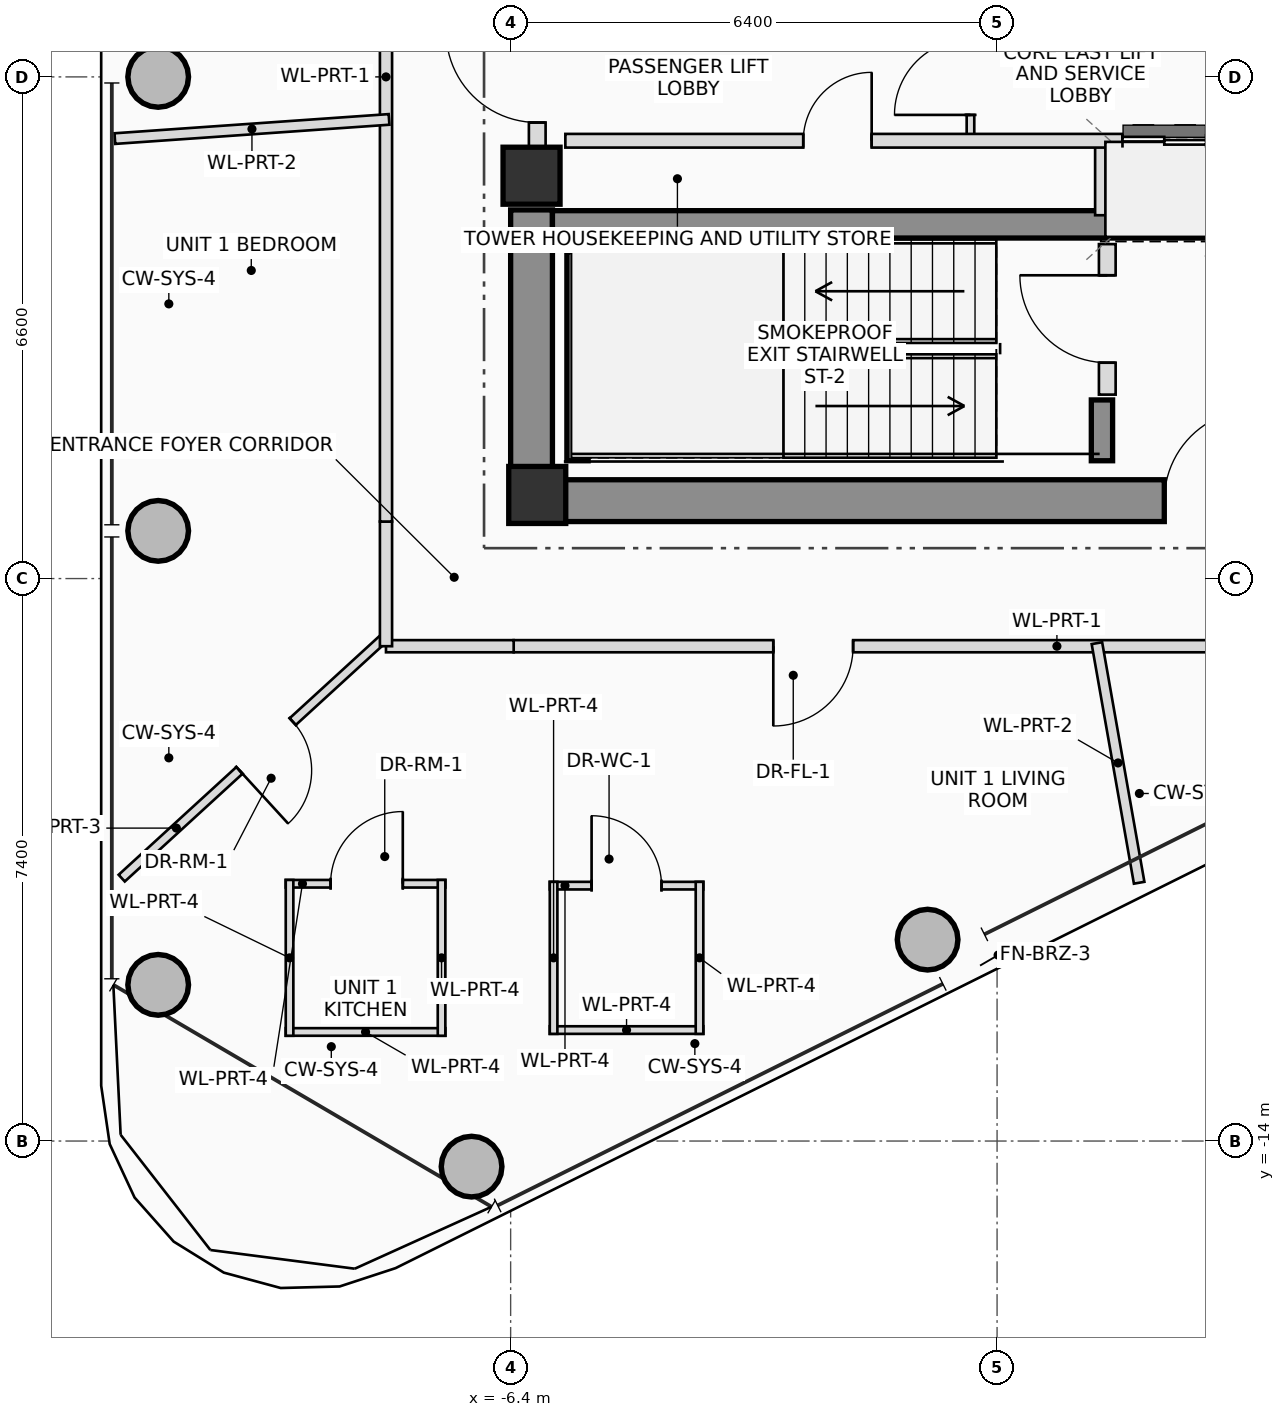
"""IFC4 building model, lengths in metres.
Left out: names, types, materials, properties, quantities, classifications, styles, units other than length and angle.
Written with IfcOpenShell. Run it as: python <this file> out.ifc"""

import sys

from ifc_helpers import new_model, si_unit, direction, frame, frame_2d, origin, origin_2d, place, context, subcontext, project, spatial, rectangle, hollow_circle, extrude, source, transform, mapped, element, fill, save


model = new_model("IFC4")
c1 = context("Model", 3, precision=1e-05, world=origin(), true_north=direction((0.0, 1.0)))
c2 = subcontext(c1, "Body", "Model", "MODEL_VIEW")
j1 = project(units=[si_unit("LENGTHUNIT", "METRE"), si_unit("PLANEANGLEUNIT", "RADIAN")], contexts=[c1])
p1 = place(None, origin())
s1 = spatial("IfcSite", under=j1, at=p1, CompositionType="ELEMENT")
p2 = place(p1, origin())
s2 = spatial("IfcBuilding", under=s1, at=p2, CompositionType="ELEMENT")
p3 = place(p2, frame((0.0, 0.0, 303.65)))
s3 = spatial("IfcBuildingStorey", under=s2, at=p3, CompositionType="ELEMENT", Elevation=303.65)
m1 = source(origin(), c2, "Body", "SweptSolid", [
    extrude(rectangle(XDim=0.75, YDim=0.75, at=origin_2d()), origin(), (0.0, 0.0, 1.0), 3.45),
])
p4 = place(p3, frame((-6.05, -5.5, 0.0), z_axis=(0.0, 0.0, 1.0), x_axis=(1.0, 0.0, 0.0)))
e1 = element("IfcColumn", 1, at=p4, inside=s3, PredefinedType="COLUMN", context=c2, shape_type="MappedRepresentation", body=[
    mapped(m1, transform((0.0, 0.0, 0.0), scale=1.0)),
])
p5 = place(p3, frame((-6.4, -5.575, 0.0), z_axis=(0.0, 0.0, 1.0), x_axis=(1.0, 0.0, 0.0)))
e2 = element("IfcWall", 2, at=p5, inside=s3, PredefinedType="SHEAR", context=c2, shape_type="SweptSolid", body=[
    extrude(rectangle(XDim=12.8, YDim=0.55, at=frame_2d((6.4, 0.0))), origin(), (0.0, 0.0, 1.0), 3.45),
])
p6 = place(p5, frame((8.6, 0.0, 0.0)))
e3 = element("IfcOpeningElement", 3, at=p6, cuts=e2, PredefinedType="OPENING", context=c2, shape_type="SweptSolid", body=[
    extrude(rectangle(XDim=1.2, YDim=2.2, at=frame_2d((0.6, 1.1))), frame((0.0, 0.285, 0.0), z_axis=(0.0, -1.0, 0.0), x_axis=(1.0, 0.0, 0.0)), (0.0, 0.0, 1.0), 0.57),
])
p7 = place(p3, frame((-6.125, -5.3, 0.0), z_axis=(0.0, 0.0, 1.0), x_axis=(0.0, 1.0, 0.0)))
e4 = element("IfcWall", 4, at=p7, inside=s3, PredefinedType="SHEAR", context=c2, shape_type="SweptSolid", body=[
    extrude(rectangle(XDim=3.55, YDim=0.55, at=frame_2d((1.775, 0.0))), origin(), (0.0, 0.0, 1.0), 3.45),
])
p8 = place(p3, frame((-5.85, -1.94, 0.0), z_axis=(0.0, 0.0, 1.0), x_axis=(1.0, 0.0, 0.0)))
e5 = element("IfcWall", 5, at=p8, inside=s3, PredefinedType="SHEAR", context=c2, shape_type="SweptSolid", body=[
    extrude(rectangle(XDim=11.7, YDim=0.36, at=frame_2d((5.85, 0.0))), origin(), (0.0, 0.0, 1.0), 3.45),
])
p9 = place(p3, frame((-5.52, -5.05, 0.0), z_axis=(0.0, 0.0, 1.0), x_axis=(0.0, 1.0, 0.0)))
e6 = element("IfcWall", 6, at=p9, inside=s3, PredefinedType="SHEAR", context=c2, shape_type="SweptSolid", body=[
    extrude(rectangle(XDim=2.75, YDim=0.28, at=frame_2d((1.375, 0.0))), origin(), (0.0, 0.0, 1.0), 3.45),
])
p10 = place(p3, frame((1.38, -5.05, 0.0), z_axis=(0.0, 0.0, 1.0), x_axis=(0.0, 1.0, 0.0)))
e7 = element("IfcWall", 7, at=p10, inside=s3, PredefinedType="SHEAR", context=c2, shape_type="SweptSolid", body=[
    extrude(rectangle(XDim=0.8, YDim=0.28, at=frame_2d((0.4, 0.0))), origin(), (0.0, 0.0, 1.0), 3.45),
])
p11 = place(p3, frame((-6.125, -1.3, 0.0), z_axis=(0.0, 0.0, 1.0), x_axis=(1.0, 0.0, 0.0)))
e8 = element("IfcColumn", 8, at=p11, inside=s3, PredefinedType="COLUMN", context=c2, shape_type="MappedRepresentation", body=[
    mapped(m1, transform((0.0, 0.0, 0.0), scale=1.0)),
])
m2 = source(origin(), c2, "Body", "SweptSolid", [
    extrude(hollow_circle(Radius=0.4, WallThickness=0.028, at=origin_2d()), origin(), (0.0, 0.0, 1.0), 3.45),
])
for number, where, z_axis, x_axis in (
    (9, (-6.914, -14.337, 0.0), (0.0, 0.0, 1.0), (1.0, 0.0, 0.0)),
    (10, (-0.914, -11.35, 0.0), (0.0, 0.0, 1.0), (1.0, 0.0, 0.0)),
    (11, (-11.037, 0.0, 0.0), (0.0, 0.0, 1.0), (1.0, 0.0, 0.0)),
    (12, (-11.037, -5.973, 0.0), (0.0, 0.0, 1.0), (1.0, 0.0, 0.0)),
    (13, (-11.037, -11.945, 0.0), (0.0, 0.0, 1.0), (1.0, 0.0, 0.0)),
):
    element("IfcColumn", number, at=place(p3, frame(where, z_axis=z_axis, x_axis=x_axis)), inside=s3, PredefinedType="COLUMN", context=c2, shape_type="MappedRepresentation", body=[
        mapped(m2, transform((0.0, 0.0, 0.0), scale=1.0)),
    ])
p12 = place(p3, frame((-6.05, -0.95, 0.0), z_axis=(0.0, 0.0, 1.0), x_axis=(0.0, 1.0, 0.0)))
e14 = element("IfcWall", 14, at=p12, inside=s3, PredefinedType="PLUMBINGWALL", context=c2, shape_type="SweptSolid", body=[
    extrude(rectangle(XDim=1.9, YDim=0.22, at=frame_2d((0.95, 0.0))), origin(), (0.0, 0.0, 1.0), 2.23),
])
p13 = place(p12, frame((0.35, 0.0, 0.0)))
e15 = element("IfcOpeningElement", 15, at=p13, cuts=e14, PredefinedType="OPENING", context=c2, shape_type="SweptSolid", body=[
    extrude(rectangle(XDim=1.2, YDim=2.2, at=frame_2d((0.6, 1.1))), frame((0.0, 0.12, 0.0), z_axis=(0.0, -1.0, 0.0), x_axis=(1.0, 0.0, 0.0)), (0.0, 0.0, 1.0), 0.24),
])
p14 = place(p3, frame((1.45, -4.18, 0.0), z_axis=(0.0, 0.0, 1.0), x_axis=(0.0, 1.0, 0.0)))
e16 = element("IfcWall", 16, at=p14, inside=s3, PredefinedType="PLUMBINGWALL", context=c2, shape_type="SweptSolid", body=[
    extrude(rectangle(XDim=1.98, YDim=0.22, at=frame_2d((0.99, 0.0))), origin(), (0.0, 0.0, 1.0), 3.25),
])
p15 = place(p14, frame((0.42, 0.0, 0.0)))
e17 = element("IfcOpeningElement", 17, at=p15, cuts=e16, PredefinedType="OPENING", context=c2, shape_type="SweptSolid", body=[
    extrude(rectangle(XDim=1.15, YDim=2.15, at=frame_2d((0.575, 1.075))), frame((0.0, 0.12, 0.0), z_axis=(0.0, -1.0, 0.0), x_axis=(1.0, 0.0, 0.0)), (0.0, 0.0, 1.0), 0.24),
])
p16 = place(p3, frame((-0.35, -0.84, 0.0), z_axis=(0.0, 0.0, 1.0), x_axis=(0.0, 1.0, 0.0)))
e18 = element("IfcWall", 18, at=p16, inside=s3, PredefinedType="PARTITIONING", context=c2, shape_type="SweptSolid", body=[
    extrude(rectangle(XDim=1.68, YDim=0.1, at=frame_2d((0.84, 0.0))), origin(), (0.0, 0.0, 1.0), 3.25),
])
p17 = place(p16, frame((0.34, 0.0, 0.0)))
e19 = element("IfcOpeningElement", 19, at=p17, cuts=e18, PredefinedType="OPENING", context=c2, shape_type="SweptSolid", body=[
    extrude(rectangle(XDim=1.0, YDim=2.25, at=frame_2d((0.5, 1.125))), frame((0.0, 0.06, 0.0), z_axis=(0.0, -1.0, 0.0), x_axis=(1.0, 0.0, 0.0)), (0.0, 0.0, 1.0), 0.12),
])
p18 = place(p3, frame((1.38, -1.82, 0.0), z_axis=(0.0, 0.0, 1.0), x_axis=(0.0, 1.0, 0.0)))
e20 = element("IfcWall", 20, at=p18, inside=s3, PredefinedType="PLUMBINGWALL", context=c2, shape_type="SweptSolid", body=[
    extrude(rectangle(XDim=0.98, YDim=0.18, at=frame_2d((0.49, 0.0))), origin(), (0.0, 0.0, 1.0), 3.25),
])
p19 = place(p3, frame((-5.68, -0.84, 0.0), z_axis=(0.0, 0.0, 1.0), x_axis=(1.0, 0.0, 0.0)))
e21 = element("IfcWall", 21, at=p19, inside=s3, PredefinedType="PLUMBINGWALL", context=c2, shape_type="SweptSolid", body=[
    extrude(rectangle(XDim=11.33, YDim=0.18, at=frame_2d((5.665, 0.0))), origin(), (0.0, 0.0, 1.0), 3.25),
])
p20 = place(p19, frame((3.13, 0.0, 0.0)))
e22 = element("IfcOpeningElement", 22, at=p20, cuts=e21, PredefinedType="OPENING", context=c2, shape_type="SweptSolid", body=[
    extrude(rectangle(XDim=0.9, YDim=2.05, at=frame_2d((0.45, 1.025))), frame((0.0, 0.1, 0.0), z_axis=(0.0, -1.0, 0.0), x_axis=(1.0, 0.0, 0.0)), (0.0, 0.0, 1.0), 0.2),
])
p21 = place(p19, frame((7.33, 0.0, 0.0)))
e23 = element("IfcOpeningElement", 23, at=p21, cuts=e21, PredefinedType="OPENING", context=c2, shape_type="SweptSolid", body=[
    extrude(rectangle(XDim=1.1, YDim=2.2, at=frame_2d((0.55, 1.1))), frame((0.0, 0.1, 0.0), z_axis=(0.0, -1.0, 0.0), x_axis=(1.0, 0.0, 0.0)), (0.0, 0.0, 1.0), 0.2),
])
p22 = place(p19, frame((9.58, 0.0, 0.0)))
e24 = element("IfcOpeningElement", 24, at=p22, cuts=e21, PredefinedType="OPENING", context=c2, shape_type="SweptSolid", body=[
    extrude(rectangle(XDim=0.9, YDim=2.05, at=frame_2d((0.45, 1.025))), frame((0.0, 0.1, 0.0), z_axis=(0.0, -1.0, 0.0), x_axis=(1.0, 0.0, 0.0)), (0.0, 0.0, 1.0), 0.2),
])
p23 = place(p3, frame((-8.07, -7.386, 0.0), z_axis=(0.0, 0.0, 1.0), x_axis=(-0.737657036201, -0.675175604523, 0.0)))
e25 = element("IfcWall", 25, at=p23, inside=s3, PredefinedType="PARTITIONING", context=c2, shape_type="SweptSolid", body=[
    extrude(rectangle(XDim=4.673, YDim=0.12, at=frame_2d((2.337, 0.0))), origin(), (0.0, 0.0, 1.0), 2.815),
])
p24 = place(p23, frame((1.623, 0.0, 0.0)))
e26 = element("IfcOpeningElement", 26, at=p24, cuts=e25, PredefinedType="OPENING", context=c2, shape_type="SweptSolid", body=[
    extrude(rectangle(XDim=0.95, YDim=2.1, at=frame_2d((0.475, 1.05))), frame((0.0, 0.07, 0.0), z_axis=(0.0, -1.0, 0.0), x_axis=(1.0, 0.0, 0.0)), (0.0, 0.0, 1.0), 0.14),
])
p25 = place(p3, frame((-5.885, -10.64, 0.0), z_axis=(0.0, 0.0, 1.0), x_axis=(1.0, 0.0, 0.0)))
e27 = element("IfcWall", 27, at=p25, inside=s3, PredefinedType="PARTITIONING", context=c2, shape_type="SweptSolid", body=[
    extrude(rectangle(XDim=2.02, YDim=0.1, at=frame_2d((1.01, 0.0))), origin(), (0.0, 0.0, 1.0), 2.905),
])
p26 = place(p25, frame((0.55, 0.0, 0.0)))
e28 = element("IfcOpeningElement", 28, at=p26, cuts=e27, PredefinedType="OPENING", context=c2, shape_type="SweptSolid", body=[
    extrude(rectangle(XDim=0.92, YDim=2.1, at=frame_2d((0.46, 1.05))), frame((0.0, 0.06, 0.0), z_axis=(0.0, -1.0, 0.0), x_axis=(1.0, 0.0, 0.0)), (0.0, 0.0, 1.0), 0.12),
])
p27 = place(p3, frame((-3.865, -12.54, 0.0), z_axis=(0.0, 0.0, 1.0), x_axis=(-1.0, 0.0, 0.0)))
e29 = element("IfcWall", 29, at=p27, inside=s3, PredefinedType="PARTITIONING", context=c2, shape_type="SweptSolid", body=[
    extrude(rectangle(XDim=2.02, YDim=0.1, at=frame_2d((1.01, 0.0))), origin(), (0.0, 0.0, 1.0), 3.25),
])
for number, where, z_axis, x_axis in (
    (30, (-3.915, -10.59, 0.0), (0.0, 0.0, 1.0), (0.0, -1.0, 0.0)),
    (31, (-5.835, -12.59, 0.0), (0.0, 0.0, 1.0), (0.0, 1.0, 0.0)),
):
    element("IfcWall", number, at=place(p3, frame(where, z_axis=z_axis, x_axis=x_axis)), inside=s3, PredefinedType="PARTITIONING", context=c2, shape_type="SweptSolid", body=[
        extrude(rectangle(XDim=2.0, YDim=0.1, at=frame_2d((1.0, 0.0))), origin(), (0.0, 0.0, 1.0), 2.905),
    ])
p28 = place(p3, frame((-9.359, -10.615, 0.0), z_axis=(0.0, 0.0, 1.0), x_axis=(1.0, 0.0, 0.0)))
e32 = element("IfcWall", 32, at=p28, inside=s3, PredefinedType="PARTITIONING", context=c2, shape_type="SweptSolid", body=[
    extrude(rectangle(XDim=2.1, YDim=0.1, at=frame_2d((1.05, 0.0))), origin(), (0.0, 0.0, 1.0), 2.905),
])
p29 = place(p28, frame((0.59, 0.0, 0.0)))
e33 = element("IfcOpeningElement", 33, at=p29, cuts=e32, PredefinedType="OPENING", context=c2, shape_type="SweptSolid", body=[
    extrude(rectangle(XDim=0.95, YDim=2.1, at=frame_2d((0.475, 1.05))), frame((0.0, 0.06, 0.0), z_axis=(0.0, -1.0, 0.0), x_axis=(1.0, 0.0, 0.0)), (0.0, 0.0, 1.0), 0.12),
])
p30 = place(p3, frame((-7.259, -12.565, 0.0), z_axis=(0.0, 0.0, 1.0), x_axis=(-1.0, 0.0, 0.0)))
e34 = element("IfcWall", 34, at=p30, inside=s3, PredefinedType="PARTITIONING", context=c2, shape_type="SweptSolid", body=[
    extrude(rectangle(XDim=2.1, YDim=0.1, at=frame_2d((1.05, 0.0))), origin(), (0.0, 0.0, 1.0), 3.25),
])
for number, where, z_axis, x_axis in (
    (35, (-7.309, -10.565, 0.0), (0.0, 0.0, 1.0), (0.0, -1.0, 0.0)),
    (36, (-9.309, -12.615, 0.0), (0.0, 0.0, 1.0), (0.0, 1.0, 0.0)),
):
    element("IfcWall", number, at=place(p3, frame(where, z_axis=z_axis, x_axis=x_axis)), inside=s3, PredefinedType="PARTITIONING", context=c2, shape_type="SweptSolid", body=[
        extrude(rectangle(XDim=2.05, YDim=0.1, at=frame_2d((1.025, 0.0))), origin(), (0.0, 0.0, 1.0), 2.905),
    ])
p31 = place(p3, frame((3.319, -7.49, 0.0), z_axis=(0.0, 0.0, 1.0), x_axis=(-1.0, 0.0, 0.0)))
e37 = element("IfcWall", 37, at=p31, inside=s3, PredefinedType="PARTITIONING", context=c2, shape_type="SweptSolid", body=[
    extrude(rectangle(XDim=9.679, YDim=0.16, at=frame_2d((4.84, 0.0))), origin(), (0.0, 0.0, 1.0), 2.655),
])
p32 = place(p31, frame((5.213, 0.0, 0.0)))
e38 = element("IfcOpeningElement", 38, at=p32, cuts=e37, PredefinedType="OPENING", context=c2, shape_type="SweptSolid", body=[
    extrude(rectangle(XDim=1.05, YDim=2.2, at=frame_2d((0.525, 1.1))), frame((0.0, 0.09, 0.0), z_axis=(0.0, -1.0, 0.0), x_axis=(1.0, 0.0, 0.0)), (0.0, 0.0, 1.0), 0.18),
])
p33 = place(p3, frame((-6.36, -7.49, 0.0), z_axis=(0.0, 0.0, 1.0), x_axis=(-1.0, 0.0, 0.0)))
e39 = element("IfcWall", 39, at=p33, inside=s3, PredefinedType="PARTITIONING", context=c2, shape_type="SweptSolid", body=[
    extrude(rectangle(XDim=1.68, YDim=0.16, at=frame_2d((0.84, 0.0))), origin(), (0.0, 0.0, 1.0), 2.655),
])
p34 = place(p3, frame((-8.04, -7.49, 0.0), z_axis=(0.0, 0.0, 1.0), x_axis=(0.0, 1.0, 0.0)))
e40 = element("IfcWall", 40, at=p34, inside=s3, PredefinedType="PARTITIONING", context=c2, shape_type="SweptSolid", body=[
    extrude(rectangle(XDim=1.64, YDim=0.16, at=frame_2d((0.82, 0.0))), origin(), (0.0, 0.0, 1.0), 3.25),
])
p35 = place(p3, frame((-8.04, -5.85, 0.0), z_axis=(0.0, 0.0, 1.0), x_axis=(0.0, 1.0, 0.0)))
e41 = element("IfcWall", 41, at=p35, inside=s3, PredefinedType="PARTITIONING", context=c2, shape_type="SweptSolid", body=[
    extrude(rectangle(XDim=11.7, YDim=0.16, at=frame_2d((5.85, 0.0))), origin(), (0.0, 0.0, 1.0), 2.655),
])
p36 = place(p3, frame((-8.0, -0.559, 0.0), z_axis=(0.0, 0.0, 1.0), x_axis=(-0.99756047181, -0.069807629118, 0.0)))
e42 = element("IfcWall", 42, at=p36, inside=s3, PredefinedType="PARTITIONING", context=c2, shape_type="SweptSolid", body=[
    extrude(rectangle(XDim=3.616, YDim=0.14, at=frame_2d((1.808, 0.0))), origin(), (0.0, 0.0, 1.0), 2.655),
])
p37 = place(p3, frame((1.314, -7.45, 0.0), z_axis=(0.0, 0.0, 1.0), x_axis=(0.173619966433, -0.984812726997, 0.0)))
e43 = element("IfcWall", 43, at=p37, inside=s3, PredefinedType="PARTITIONING", context=c2, shape_type="SweptSolid", body=[
    extrude(rectangle(XDim=3.2, YDim=0.14, at=frame_2d((1.6, 0.0))), origin(), (0.0, 0.0, 1.0), 2.815),
])
p38 = place(p6, origin())
e44 = element("IfcDoor", 44, at=p38, inside=s3, OperationType="SINGLE_SWING_RIGHT", PredefinedType="DOOR", context=c2, shape_type="SweptSolid", body=[
    extrude(rectangle(XDim=1.2, YDim=2.2, at=frame_2d((0.6, 1.1))), frame((0.0, 0.025, 0.0), z_axis=(0.0, -1.0, 0.0), x_axis=(1.0, 0.0, 0.0)), (0.0, 0.0, 1.0), 0.05),
])
fill(e3, e44)
p39 = place(p13, origin())
e45 = element("IfcDoor", 45, at=p39, inside=s3, OperationType="SINGLE_SWING_RIGHT", PredefinedType="DOOR", context=c2, shape_type="SweptSolid", body=[
    extrude(rectangle(XDim=1.2, YDim=2.2, at=frame_2d((0.6, 1.1))), frame((0.0, 0.025, 0.0), z_axis=(0.0, -1.0, 0.0), x_axis=(1.0, 0.0, 0.0)), (0.0, 0.0, 1.0), 0.05),
])
fill(e15, e45)
p40 = place(p15, origin())
e46 = element("IfcDoor", 46, at=p40, inside=s3, OperationType="SINGLE_SWING_RIGHT", PredefinedType="DOOR", context=c2, shape_type="SweptSolid", body=[
    extrude(rectangle(XDim=1.15, YDim=2.15, at=frame_2d((0.575, 1.075))), frame((0.0, 0.025, 0.0), z_axis=(0.0, -1.0, 0.0), x_axis=(1.0, 0.0, 0.0)), (0.0, 0.0, 1.0), 0.05),
])
fill(e17, e46)
p41 = place(p17, origin())
e47 = element("IfcDoor", 47, at=p41, inside=s3, OperationType="SINGLE_SWING_LEFT", PredefinedType="DOOR", context=c2, shape_type="SweptSolid", body=[
    extrude(rectangle(XDim=1.0, YDim=2.25, at=frame_2d((0.5, 1.125))), frame((0.0, 0.025, 0.0), z_axis=(0.0, -1.0, 0.0), x_axis=(1.0, 0.0, 0.0)), (0.0, 0.0, 1.0), 0.05),
])
fill(e19, e47)
p42 = place(p20, origin())
e48 = element("IfcDoor", 48, at=p42, inside=s3, OperationType="SINGLE_SWING_RIGHT", PredefinedType="DOOR", context=c2, shape_type="SweptSolid", body=[
    extrude(rectangle(XDim=0.9, YDim=2.05, at=frame_2d((0.45, 1.025))), frame((0.0, 0.025, 0.0), z_axis=(0.0, -1.0, 0.0), x_axis=(1.0, 0.0, 0.0)), (0.0, 0.0, 1.0), 0.05),
])
fill(e22, e48)
p43 = place(p21, origin())
e49 = element("IfcDoor", 49, at=p43, inside=s3, OperationType="DOUBLE_DOOR_SLIDING", PredefinedType="DOOR", context=c2, shape_type="SweptSolid", body=[
    extrude(rectangle(XDim=1.1, YDim=2.2, at=frame_2d((0.55, 1.1))), frame((0.0, 0.025, 0.0), z_axis=(0.0, -1.0, 0.0), x_axis=(1.0, 0.0, 0.0)), (0.0, 0.0, 1.0), 0.05),
])
fill(e23, e49)
p44 = place(p24, origin())
e50 = element("IfcDoor", 50, at=p44, inside=s3, OperationType="SINGLE_SWING_RIGHT", PredefinedType="DOOR", context=c2, shape_type="SweptSolid", body=[
    extrude(rectangle(XDim=0.95, YDim=2.1, at=frame_2d((0.475, 1.05))), frame((0.0, 0.025, 0.0), z_axis=(0.0, -1.0, 0.0), x_axis=(1.0, 0.0, 0.0)), (0.0, 0.0, 1.0), 0.05),
])
fill(e26, e50)
p45 = place(p26, origin())
e51 = element("IfcDoor", 51, at=p45, inside=s3, OperationType="SINGLE_SWING_LEFT", PredefinedType="DOOR", context=c2, shape_type="SweptSolid", body=[
    extrude(rectangle(XDim=0.92, YDim=2.1, at=frame_2d((0.46, 1.05))), frame((0.0, 0.025, 0.0), z_axis=(0.0, -1.0, 0.0), x_axis=(1.0, 0.0, 0.0)), (0.0, 0.0, 1.0), 0.05),
])
fill(e28, e51)
p46 = place(p29, origin())
e52 = element("IfcDoor", 52, at=p46, inside=s3, OperationType="SINGLE_SWING_RIGHT", PredefinedType="DOOR", context=c2, shape_type="SweptSolid", body=[
    extrude(rectangle(XDim=0.95, YDim=2.1, at=frame_2d((0.475, 1.05))), frame((0.0, 0.025, 0.0), z_axis=(0.0, -1.0, 0.0), x_axis=(1.0, 0.0, 0.0)), (0.0, 0.0, 1.0), 0.05),
])
fill(e33, e52)
p47 = place(p32, origin())
e53 = element("IfcDoor", 53, at=p47, inside=s3, OperationType="SINGLE_SWING_RIGHT", PredefinedType="DOOR", context=c2, shape_type="SweptSolid", body=[
    extrude(rectangle(XDim=1.05, YDim=2.2, at=frame_2d((0.525, 1.1))), frame((0.0, 0.025, 0.0), z_axis=(0.0, -1.0, 0.0), x_axis=(1.0, 0.0, 0.0)), (0.0, 0.0, 1.0), 0.05),
])
fill(e38, e53)
save(model, sys.argv[1])
